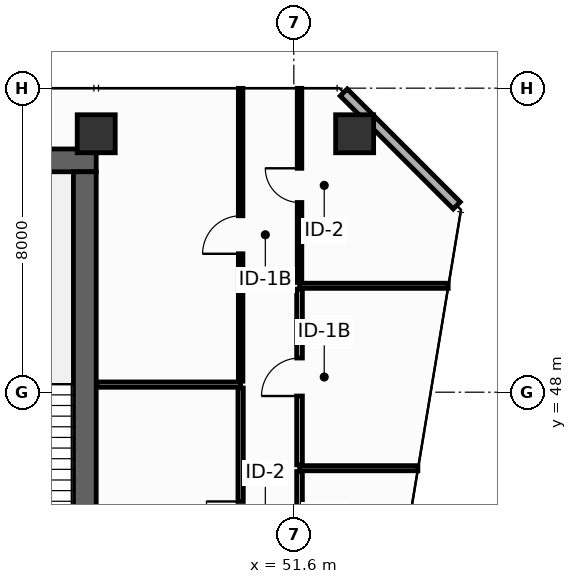
"""IFC4 building model, lengths in metres.
Left out: names, types, materials, properties, quantities, classifications, styles, units other than length and angle.
Written with IfcOpenShell. Run it as: python <this file> out.ifc"""

import sys

from ifc_helpers import new_model, si_unit, direction, frame, frame_2d, origin, origin_2d, place, context, subcontext, project, spatial, rectangle, hollow_rectangle, extrude, element, fill, save


model = new_model("IFC4")
c1 = context("Model", 3, precision=1e-05, world=origin(), true_north=direction((0.0, 1.0)))
c2 = subcontext(c1, "Body", "Model", "MODEL_VIEW")
j1 = project(units=[si_unit("LENGTHUNIT", "METRE"), si_unit("PLANEANGLEUNIT", "RADIAN")], contexts=[c1])
p1 = place(None, origin())
s1 = spatial("IfcSite", under=j1, at=p1, CompositionType="ELEMENT")
p2 = place(p1, origin())
s2 = spatial("IfcBuilding", under=s1, at=p2, CompositionType="ELEMENT")
p3 = place(p2, frame((0.0, 0.0, 101.6)))
s3 = spatial("IfcBuildingStorey", under=s2, at=p3, CompositionType="ELEMENT", Elevation=101.6)
p4 = place(p3, frame((13.5, 54.1, 0.0), z_axis=(0.0, 0.0, 1.0), x_axis=(1.0, 0.0, 0.0)))
e1 = element("IfcWall", 1, at=p4, inside=s3, PredefinedType="SHEAR", context=c2, shape_type="SweptSolid", body=[
    extrude(rectangle(XDim=32.9, YDim=0.6, at=frame_2d((16.45, 0.0))), origin(), (0.0, 0.0, 1.0), 4.15),
])
p5 = place(p3, frame((46.1, 43.4, 0.0), z_axis=(0.0, 0.0, 1.0), x_axis=(0.0, 1.0, 0.0)))
e2 = element("IfcWall", 2, at=p5, inside=s3, PredefinedType="SHEAR", context=c2, shape_type="SweptSolid", body=[
    extrude(rectangle(XDim=10.4, YDim=0.6, at=frame_2d((5.2, 0.0))), origin(), (0.0, 0.0, 1.0), 4.15),
])
for number, where, z_axis, x_axis in (
    (3, (46.4, 54.8, 0.0), (0.0, 0.0, 1.0), (1.0, 0.0, 0.0)),
    (4, (53.2, 54.8, 0.0), (0.0, 0.0, 1.0), (1.0, 0.0, 0.0)),
):
    element("IfcColumn", number, at=place(p3, frame(where, z_axis=z_axis, x_axis=x_axis)), inside=s3, PredefinedType="COLUMN", context=c2, shape_type="SweptSolid", body=[
        extrude(hollow_rectangle(XDim=1.0, YDim=1.0, WallThickness=0.045, at=origin_2d()), origin(), (0.0, 0.0, 1.0), 4.4),
    ])
p6 = place(p3, frame((55.887, 52.913, 0.0), z_axis=(0.0, 0.0, 1.0), x_axis=(-0.707106781187, 0.707106781187, 0.0)))
e5 = element("IfcWall", 5, at=p6, inside=s3, PredefinedType="STANDARD", context=c2, shape_type="SweptSolid", body=[
    extrude(rectangle(XDim=4.206, YDim=0.26, at=frame_2d((2.103, 0.0))), origin(), (0.0, 0.0, 1.0), 4.15),
])
p7 = place(p3, frame((46.42, 48.2, 0.0), z_axis=(0.0, 0.0, 1.0), x_axis=(1.0, 0.0, 0.0)))
e6 = element("IfcWall", 6, at=p7, inside=s3, PredefinedType="PARTITIONING", context=c2, shape_type="SweptSolid", body=[
    extrude(rectangle(XDim=3.78, YDim=0.14, at=frame_2d((1.89, 0.0))), origin(), (0.0, 0.0, 1.0), 4.15),
])
p8 = place(p3, frame((50.2, 41.24, 0.0), z_axis=(0.0, 0.0, 1.0), x_axis=(0.0, 1.0, 0.0)))
e7 = element("IfcWall", 7, at=p8, inside=s3, PredefinedType="PARTITIONING", context=c2, shape_type="SweptSolid", body=[
    extrude(rectangle(XDim=6.87, YDim=0.14, at=frame_2d((3.435, 0.0))), origin(), (0.0, 0.0, 1.0), 3.335),
])
p9 = place(p8, frame((2.985, 0.0, 0.0)))
e8 = element("IfcOpeningElement", 8, at=p9, cuts=e7, PredefinedType="OPENING", context=c2, shape_type="SweptSolid", body=[
    extrude(rectangle(XDim=0.9, YDim=2.1, at=frame_2d((0.45, 1.05))), frame((0.0, 0.08, 0.0), z_axis=(0.0, -1.0, 0.0), x_axis=(1.0, 0.0, 0.0)), (0.0, 0.0, 1.0), 0.16),
])
p10 = place(p3, frame((50.2, 48.29, 0.0), z_axis=(0.0, 0.0, 1.0), x_axis=(0.0, 1.0, 0.0)))
e9 = element("IfcWall", 9, at=p10, inside=s3, PredefinedType="PARTITIONING", context=c2, shape_type="SweptSolid", body=[
    extrude(rectangle(XDim=7.705, YDim=0.12, at=frame_2d((3.853, 0.0))), origin(), (0.0, 0.0, 1.0), 3.435),
])
p11 = place(p10, frame((3.352, 0.0, 0.0)))
e10 = element("IfcOpeningElement", 10, at=p11, cuts=e9, PredefinedType="OPENING", context=c2, shape_type="SweptSolid", body=[
    extrude(rectangle(XDim=1.0, YDim=2.15, at=frame_2d((0.5, 1.075))), frame((0.0, 0.07, 0.0), z_axis=(0.0, -1.0, 0.0), x_axis=(1.0, 0.0, 0.0)), (0.0, 0.0, 1.0), 0.14),
])
p12 = place(p3, frame((51.75, 46.0, 0.0), z_axis=(0.0, 0.0, 1.0), x_axis=(1.0, 0.0, 0.0)))
e11 = element("IfcWall", 11, at=p12, inside=s3, PredefinedType="PARTITIONING", context=c2, shape_type="SweptSolid", body=[
    extrude(rectangle(XDim=3.115, YDim=0.135, at=frame_2d((1.557, 0.0))), origin(), (0.0, 0.0, 1.0), 3.335),
])
p13 = place(p3, frame((51.75, 50.8, 0.0), z_axis=(0.0, 0.0, 1.0), x_axis=(1.0, 0.0, 0.0)))
e12 = element("IfcWall", 12, at=p13, inside=s3, PredefinedType="PARTITIONING", context=c2, shape_type="SweptSolid", body=[
    extrude(rectangle(XDim=3.912, YDim=0.135, at=frame_2d((1.956, 0.0))), origin(), (0.0, 0.0, 1.0), 3.335),
])
p14 = place(p3, frame((51.75, 41.238, 0.0), z_axis=(0.0, 0.0, 1.0), x_axis=(0.0, 1.0, 0.0)))
e13 = element("IfcWall", 13, at=p14, inside=s3, PredefinedType="PARTITIONING", context=c2, shape_type="SweptSolid", body=[
    extrude(rectangle(XDim=4.675, YDim=0.15, at=frame_2d((2.337, 0.0))), origin(), (0.0, 0.0, 1.0), 3.335),
])
p15 = place(p14, frame((1.813, 0.0, 0.0)))
e14 = element("IfcOpeningElement", 14, at=p15, cuts=e13, PredefinedType="OPENING", context=c2, shape_type="SweptSolid", body=[
    extrude(rectangle(XDim=1.05, YDim=2.15, at=frame_2d((0.525, 1.075))), frame((0.0, 0.085, 0.0), z_axis=(0.0, -1.0, 0.0), x_axis=(1.0, 0.0, 0.0)), (0.0, 0.0, 1.0), 0.17),
])
p16 = place(p3, frame((51.75, 46.087, 0.0), z_axis=(0.0, 0.0, 1.0), x_axis=(0.0, 1.0, 0.0)))
e15 = element("IfcWall", 15, at=p16, inside=s3, PredefinedType="PARTITIONING", context=c2, shape_type="SweptSolid", body=[
    extrude(rectangle(XDim=4.625, YDim=0.15, at=frame_2d((2.312, 0.0))), origin(), (0.0, 0.0, 1.0), 4.15),
])
p17 = place(p16, frame((1.812, 0.0, 0.0)))
e16 = element("IfcOpeningElement", 16, at=p17, cuts=e15, PredefinedType="OPENING", context=c2, shape_type="SweptSolid", body=[
    extrude(rectangle(XDim=1.0, YDim=2.15, at=frame_2d((0.5, 1.075))), frame((0.0, 0.085, 0.0), z_axis=(0.0, -1.0, 0.0), x_axis=(1.0, 0.0, 0.0)), (0.0, 0.0, 1.0), 0.17),
])
p18 = place(p3, frame((51.75, 50.887, 0.0), z_axis=(0.0, 0.0, 1.0), x_axis=(0.0, 1.0, 0.0)))
e17 = element("IfcWall", 17, at=p18, inside=s3, PredefinedType="PARTITIONING", context=c2, shape_type="SweptSolid", body=[
    extrude(rectangle(XDim=5.108, YDim=0.12, at=frame_2d((2.554, 0.0))), origin(), (0.0, 0.0, 1.0), 3.435),
])
p19 = place(p18, frame((2.104, 0.0, 0.0)))
e18 = element("IfcOpeningElement", 18, at=p19, cuts=e17, PredefinedType="OPENING", context=c2, shape_type="SweptSolid", body=[
    extrude(rectangle(XDim=0.9, YDim=2.1, at=frame_2d((0.45, 1.05))), frame((0.0, 0.07, 0.0), z_axis=(0.0, -1.0, 0.0), x_axis=(1.0, 0.0, 0.0)), (0.0, 0.0, 1.0), 0.14),
])
p20 = place(p9, origin())
e19 = element("IfcDoor", 19, at=p20, inside=s3, OperationType="SINGLE_SWING_RIGHT", PredefinedType="DOOR", context=c2, shape_type="SweptSolid", body=[
    extrude(rectangle(XDim=0.9, YDim=2.1, at=frame_2d((0.45, 1.05))), frame((0.0, 0.025, 0.0), z_axis=(0.0, -1.0, 0.0), x_axis=(1.0, 0.0, 0.0)), (0.0, 0.0, 1.0), 0.05),
])
fill(e8, e19)
p21 = place(p11, origin())
e20 = element("IfcDoor", 20, at=p21, inside=s3, OperationType="SINGLE_SWING_LEFT", PredefinedType="DOOR", context=c2, shape_type="SweptSolid", body=[
    extrude(rectangle(XDim=1.0, YDim=2.15, at=frame_2d((0.5, 1.075))), frame((0.0, 0.025, 0.0), z_axis=(0.0, -1.0, 0.0), x_axis=(1.0, 0.0, 0.0)), (0.0, 0.0, 1.0), 0.05),
])
fill(e10, e20)
p22 = place(p17, origin())
e21 = element("IfcDoor", 21, at=p22, inside=s3, OperationType="SINGLE_SWING_LEFT", PredefinedType="DOOR", context=c2, shape_type="SweptSolid", body=[
    extrude(rectangle(XDim=1.0, YDim=2.15, at=frame_2d((0.5, 1.075))), frame((0.0, 0.025, 0.0), z_axis=(0.0, -1.0, 0.0), x_axis=(1.0, 0.0, 0.0)), (0.0, 0.0, 1.0), 0.05),
])
fill(e16, e21)
p23 = place(p19, origin())
e22 = element("IfcDoor", 22, at=p23, inside=s3, OperationType="SINGLE_SWING_RIGHT", PredefinedType="DOOR", context=c2, shape_type="SweptSolid", body=[
    extrude(rectangle(XDim=0.9, YDim=2.1, at=frame_2d((0.45, 1.05))), frame((0.0, 0.025, 0.0), z_axis=(0.0, -1.0, 0.0), x_axis=(1.0, 0.0, 0.0)), (0.0, 0.0, 1.0), 0.05),
])
fill(e18, e22)
save(model, sys.argv[1])
